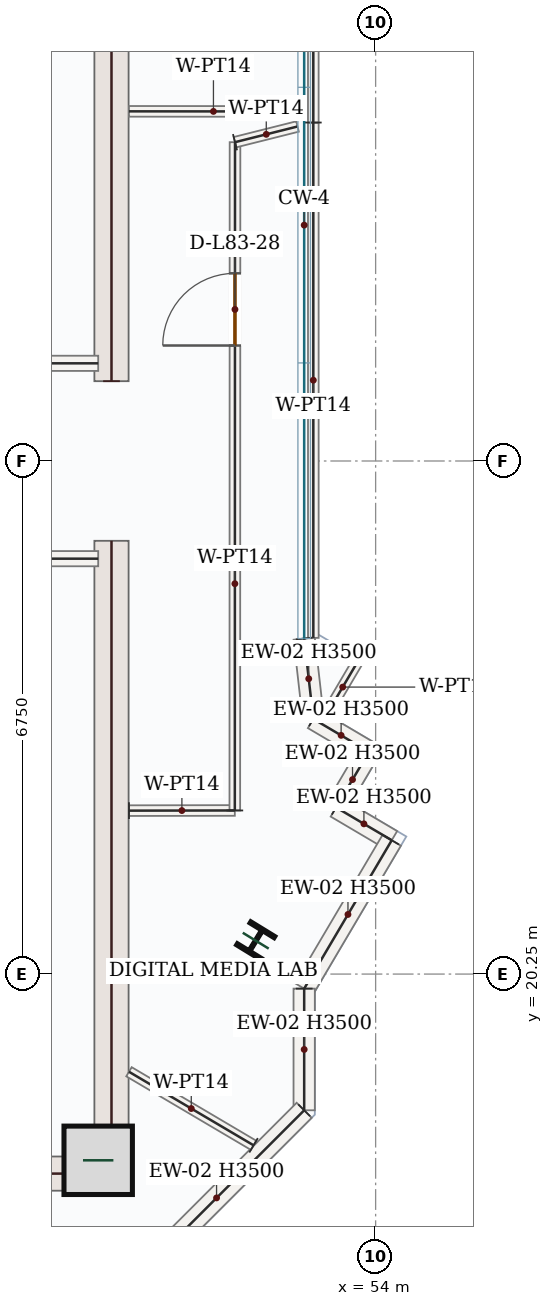
"""IFC4 building model, lengths in metres.
Left out: names, types, materials, properties, quantities, classifications, styles, units other than length and angle.
Written with IfcOpenShell. Run it as: python <this file> out.ifc"""

import sys

from ifc_helpers import new_model, si_unit, direction, frame, frame_2d, origin, origin_2d, place, context, subcontext, project, spatial, rectangle, i_section, extrude, source, transform, mapped, element, fill, save


model = new_model("IFC4")
c1 = context("Model", 3, precision=1e-05, world=origin(), true_north=direction((0.0, 1.0)))
c2 = subcontext(c1, "Body", "Model", "MODEL_VIEW")
j1 = project(units=[si_unit("LENGTHUNIT", "METRE"), si_unit("PLANEANGLEUNIT", "RADIAN")], contexts=[c1])
p1 = place(None, origin())
s1 = spatial("IfcSite", under=j1, at=p1, CompositionType="ELEMENT")
p2 = place(p1, origin())
s2 = spatial("IfcBuilding", under=s1, at=p2, CompositionType="ELEMENT")
p3 = place(p2, frame((0.0, 0.0, 342.3)))
s3 = spatial("IfcBuildingStorey", under=s2, at=p3, CompositionType="ELEMENT", Elevation=342.3)
m1 = source(origin(), c2, "Body", "SweptSolid", [
    extrude(rectangle(XDim=8.55, YDim=0.45, at=frame_2d((4.275, 0.0))), origin(), (0.0, 0.0, 1.0), 3.5),
])
for number, where, z_axis, x_axis in (
    (1, (50.525, 17.4, 0.0), (0.0, 0.0, 1.0), (0.0, 1.0, 0.0)),
    (2, (50.525, 28.05, 0.0), (0.0, 0.0, 1.0), (0.0, 1.0, 0.0)),
):
    element("IfcWall", number, at=place(p3, frame(where, z_axis=z_axis, x_axis=x_axis)), inside=s3, PredefinedType="SHEAR", context=c2, shape_type="MappedRepresentation", body=[
        mapped(m1, transform((0.0, 0.0, 0.0), x_axis=(1.0, 0.0, 0.0), y_axis=(0.0, 1.0, 0.0), z_axis=(0.0, 0.0, 1.0), scale=1.0)),
    ])
m2 = source(origin(), c2, "Body", "SweptSolid", [
    extrude(rectangle(XDim=7.1, YDim=0.45, at=frame_2d((3.55, 0.0))), origin(), (0.0, 0.0, 1.0), 3.5),
])
p4 = place(p3, frame((43.2, 17.625, 0.0), z_axis=(0.0, 0.0, 1.0), x_axis=(1.0, 0.0, 0.0)))
e3 = element("IfcWall", 3, at=p4, inside=s3, PredefinedType="SHEAR", context=c2, shape_type="MappedRepresentation", body=[
    mapped(m2, transform((0.0, 0.0, 0.0), x_axis=(1.0, 0.0, 0.0), y_axis=(0.0, 1.0, 0.0), z_axis=(0.0, 0.0, 1.0), scale=1.0)),
])
m3 = source(origin(), c2, "Body", "SweptSolid", [
    extrude(rectangle(XDim=0.9, YDim=0.9, at=origin_2d()), origin(), (0.0, 0.0, 1.0), 3.75),
])
p5 = place(p3, frame((50.35, 17.8, 0.0), z_axis=(0.0, 0.0, 1.0), x_axis=(1.0, 0.0, 0.0)))
e4 = element("IfcColumn", 4, at=p5, inside=s3, PredefinedType="COLUMN", context=c2, shape_type="MappedRepresentation", body=[
    mapped(m3, transform((0.0, 0.0, 0.0), x_axis=(1.0, 0.0, 0.0), y_axis=(0.0, 1.0, 0.0), z_axis=(0.0, 0.0, 1.0), scale=1.0)),
])
m4 = source(origin(), c2, "Body", "SweptSolid", [
    extrude(i_section(OverallWidth=0.369, OverallDepth=0.356, WebThickness=0.011, FlangeThickness=0.018, FilletRadius=0.018, at=origin_2d()), origin(), (0.0, 0.0, 1.0), 3.75),
])
p6 = place(p3, frame((52.423, 20.689, 0.0), z_axis=(0.0, 0.0, 1.0), x_axis=(-0.852640164354, 0.522498564716, 0.0)))
e5 = element("IfcColumn", 5, at=p6, inside=s3, PredefinedType="COLUMN", context=c2, shape_type="MappedRepresentation", body=[
    mapped(m4, transform((0.0, 0.0, 0.0), x_axis=(1.0, 0.0, 0.0), y_axis=(0.0, 1.0, 0.0), z_axis=(0.0, 0.0, 1.0), scale=1.0)),
])
m5 = source(origin(), c2, "Body", "SweptSolid", [
    extrude(rectangle(XDim=1.065, YDim=0.28, at=frame_2d((0.532, 0.0))), origin(), (0.0, 0.0, 1.0), 3.5),
])
p7 = place(p3, frame((53.06, 24.664, 0.0), z_axis=(0.0, 0.0, 1.0), x_axis=(0.112595815397, -0.993640871923, 0.0)))
e6 = element("IfcWall", 6, at=p7, inside=s3, PredefinedType="SOLIDWALL", context=c2, shape_type="MappedRepresentation", body=[
    mapped(m5, transform((0.0, 0.0, 0.0), x_axis=(1.0, 0.0, 0.0), y_axis=(0.0, 1.0, 0.0), z_axis=(0.0, 0.0, 1.0), scale=1.0)),
])
m6 = source(origin(), c2, "Body", "SweptSolid", [
    extrude(rectangle(XDim=0.85, YDim=0.28, at=frame_2d((0.425, 0.0))), origin(), (0.0, 0.0, 1.0), 3.5),
])
for number, where, z_axis, x_axis in (
    (7, (53.18, 23.606, 0.0), (0.0, 0.0, 1.0), (0.861, -0.508, 0.0)),
    (8, (53.912, 23.175, 0.0), (0.0, 0.0, 1.0), (-0.508, -0.861, 0.0)),
):
    element("IfcWall", number, at=place(p3, frame(where, z_axis=z_axis, x_axis=x_axis)), inside=s3, PredefinedType="SOLIDWALL", context=c2, shape_type="MappedRepresentation", body=[
        mapped(m6, transform((0.0, 0.0, 0.0), x_axis=(1.0, 0.0, 0.0), y_axis=(0.0, 1.0, 0.0), z_axis=(0.0, 0.0, 1.0), scale=1.0)),
    ])
m7 = source(origin(), c2, "Body", "SweptSolid", [
    extrude(rectangle(XDim=0.85, YDim=0.28, at=frame_2d((0.425, 0.0))), origin(), (0.0, 0.0, 1.0), 3.5),
])
p8 = place(p3, frame((53.48, 22.442, 0.0), z_axis=(0.0, 0.0, 1.0), x_axis=(0.861246626019, -0.508187218622, 0.0)))
e9 = element("IfcWall", 9, at=p8, inside=s3, PredefinedType="SOLIDWALL", context=c2, shape_type="MappedRepresentation", body=[
    mapped(m7, transform((0.0, 0.0, 0.0), x_axis=(1.0, 0.0, 0.0), y_axis=(0.0, 1.0, 0.0), z_axis=(0.0, 0.0, 1.0), scale=1.0)),
])
m8 = source(origin(), c2, "Body", "SweptSolid", [
    extrude(rectangle(XDim=2.266, YDim=0.28, at=frame_2d((1.133, 0.0))), origin(), (0.0, 0.0, 1.0), 3.5),
])
p9 = place(p3, frame((54.212, 22.01, 0.0), z_axis=(0.0, 0.0, 1.0), x_axis=(-0.508224770074, -0.861224467304, 0.0)))
e10 = element("IfcWall", 10, at=p9, inside=s3, PredefinedType="SOLIDWALL", context=c2, shape_type="MappedRepresentation", body=[
    mapped(m8, transform((0.0, 0.0, 0.0), x_axis=(1.0, 0.0, 0.0), y_axis=(0.0, 1.0, 0.0), z_axis=(0.0, 0.0, 1.0), scale=1.0)),
])
m9 = source(origin(), c2, "Body", "SweptSolid", [
    extrude(rectangle(XDim=1.601, YDim=0.28, at=frame_2d((0.8, 0.0))), origin(), (0.0, 0.0, 1.0), 3.5),
])
p10 = place(p3, frame((53.06, 20.059, 0.0), z_axis=(0.0, 0.0, 1.0), x_axis=(0.0, -1.0, 0.0)))
e11 = element("IfcWall", 11, at=p10, inside=s3, PredefinedType="SOLIDWALL", context=c2, shape_type="MappedRepresentation", body=[
    mapped(m9, transform((0.0, 0.0, 0.0), x_axis=(1.0, 0.0, 0.0), y_axis=(0.0, 1.0, 0.0), z_axis=(0.0, 0.0, 1.0), scale=1.0)),
])
m10 = source(origin(), c2, "Body", "SweptSolid", [
    extrude(rectangle(XDim=3.261, YDim=0.28, at=frame_2d((1.63, 0.0))), origin(), (0.0, 0.0, 1.0), 3.5),
])
p11 = place(p3, frame((53.06, 18.458, 0.0), z_axis=(0.0, 0.0, 1.0), x_axis=(-0.707106781187, -0.707106781187, 0.0)))
e12 = element("IfcWall", 12, at=p11, inside=s3, PredefinedType="SOLIDWALL", context=c2, shape_type="MappedRepresentation", body=[
    mapped(m10, transform((0.0, 0.0, 0.0), x_axis=(1.0, 0.0, 0.0), y_axis=(0.0, 1.0, 0.0), z_axis=(0.0, 0.0, 1.0), scale=1.0)),
])
m11 = source(origin(), c2, "Body", "SweptSolid", [
    extrude(rectangle(XDim=4.25, YDim=0.2, at=frame_2d((2.125, 0.0))), origin(), (0.0, 0.0, 1.0), 3.5),
])
for number, where, z_axis, x_axis in (
    (13, (46.1, 25.715, 0.0), (0.0, 0.0, 1.0), (1.0, 0.0, 0.0)),
    (14, (46.1, 28.285, 0.0), (0.0, 0.0, 1.0), (1.0, 0.0, 0.0)),
):
    element("IfcWall", number, at=place(p3, frame(where, z_axis=z_axis, x_axis=x_axis)), inside=s3, PredefinedType="SOLIDWALL", context=c2, shape_type="MappedRepresentation", body=[
        mapped(m11, transform((0.0, 0.0, 0.0), x_axis=(1.0, 0.0, 0.0), y_axis=(0.0, 1.0, 0.0), z_axis=(0.0, 0.0, 1.0), scale=1.0)),
    ])
m12 = source(origin(), c2, "Body", "SweptSolid", [
    extrude(rectangle(XDim=1.393, YDim=0.14, at=frame_2d((0.696, 0.0))), origin(), (0.0, 0.0, 1.0), 3.5),
])
p12 = place(p3, frame((50.755, 22.4, 0.0), z_axis=(0.0, 0.0, 1.0), x_axis=(0.999998755213, 0.001577838148, 0.0)))
e15 = element("IfcWall", 15, at=p12, inside=s3, PredefinedType="PARTITIONING", context=c2, shape_type="MappedRepresentation", body=[
    mapped(m12, transform((0.0, 0.0, 0.0), x_axis=(1.0, 0.0, 0.0), y_axis=(0.0, 1.0, 0.0), z_axis=(0.0, 0.0, 1.0), scale=1.0)),
])
p13 = place(p3, frame((52.147, 22.402, 0.0), z_axis=(0.0, 0.0, 1.0), x_axis=(0.000277685205, 0.999999961445, 0.0)))
e16 = element("IfcWall", 16, at=p13, inside=s3, PredefinedType="PARTITIONING", context=c2, shape_type="SweptSolid", body=[
    extrude(rectangle(XDim=8.792, YDim=0.14, at=frame_2d((4.396, 0.0))), origin(), (0.0, 0.0, 1.0), 3.5),
])
p14 = place(p13, frame((6.117, 0.0, 0.0)))
e17 = element("IfcOpeningElement", 17, at=p14, cuts=e16, PredefinedType="OPENING", context=c2, shape_type="SweptSolid", body=[
    extrude(rectangle(XDim=0.95, YDim=2.15, at=frame_2d((0.475, 1.075))), frame((0.0, 0.08, 0.0), z_axis=(0.0, -1.0, 0.0), x_axis=(1.0, 0.0, 0.0)), (0.0, 0.0, 1.0), 0.16),
])
m13 = source(origin(), c2, "Body", "SweptSolid", [
    extrude(rectangle(XDim=0.848, YDim=0.14, at=frame_2d((0.424, 0.0))), origin(), (0.0, 0.0, 1.0), 3.5),
])
p15 = place(p3, frame((52.15, 31.194, 0.0), z_axis=(0.0, 0.0, 1.0), x_axis=(0.969955921728, 0.243280722428, 0.0)))
e18 = element("IfcWall", 18, at=p15, inside=s3, PredefinedType="PARTITIONING", context=c2, shape_type="MappedRepresentation", body=[
    mapped(m13, transform((0.0, 0.0, 0.0), x_axis=(1.0, 0.0, 0.0), y_axis=(0.0, 1.0, 0.0), z_axis=(0.0, 0.0, 1.0), scale=1.0)),
])
m14 = source(origin(), c2, "Body", "SweptSolid", [
    extrude(rectangle(XDim=6.78, YDim=0.14, at=frame_2d((3.39, 0.0))), origin(), (0.0, 0.0, 1.0), 3.5),
])
p16 = place(p3, frame((53.18, 31.453, 0.0), z_axis=(0.0, 0.0, 1.0), x_axis=(7.2022759e-05, -0.999999997406, 0.0)))
e19 = element("IfcWall", 19, at=p16, inside=s3, PredefinedType="PARTITIONING", context=c2, shape_type="MappedRepresentation", body=[
    mapped(m14, transform((0.0, 0.0, 0.0), x_axis=(1.0, 0.0, 0.0), y_axis=(0.0, 1.0, 0.0), z_axis=(0.0, 0.0, 1.0), scale=1.0)),
])
m15 = source(origin(), c2, "Body", "SweptSolid", [
    extrude(rectangle(XDim=0.825, YDim=0.14, at=frame_2d((0.413, 0.0))), origin(), (0.0, 0.0, 1.0), 3.5),
])
p17 = place(p3, frame((53.776, 24.381, 0.0), z_axis=(0.0, 0.0, 1.0), x_axis=(-0.507472658058, -0.861667860213, 0.0)))
e20 = element("IfcWall", 20, at=p17, inside=s3, PredefinedType="PARTITIONING", context=c2, shape_type="MappedRepresentation", body=[
    mapped(m15, transform((0.0, 0.0, 0.0), x_axis=(1.0, 0.0, 0.0), y_axis=(0.0, 1.0, 0.0), z_axis=(0.0, 0.0, 1.0), scale=1.0)),
])
m16 = source(origin(), c2, "Body", "SweptSolid", [
    extrude(rectangle(XDim=1.904, YDim=0.14, at=frame_2d((0.952, 0.0))), origin(), (0.0, 0.0, 1.0), 3.5),
])
p18 = place(p3, frame((52.394, 17.997, 0.0), z_axis=(0.0, 0.0, 1.0), x_axis=(-0.86120470185, 0.508258262611, 0.0)))
e21 = element("IfcWall", 21, at=p18, inside=s3, PredefinedType="PARTITIONING", context=c2, shape_type="MappedRepresentation", body=[
    mapped(m16, transform((0.0, 0.0, 0.0), x_axis=(1.0, 0.0, 0.0), y_axis=(0.0, 1.0, 0.0), z_axis=(0.0, 0.0, 1.0), scale=1.0)),
])
m17 = source(origin(), c2, "Body", "SweptSolid", [
    extrude(rectangle(XDim=2.223, YDim=0.14, at=frame_2d((1.111, 0.0))), origin(), (0.0, 0.0, 1.0), 3.5),
])
p19 = place(p3, frame((52.978, 31.598, 0.0), z_axis=(0.0, 0.0, 1.0), x_axis=(-0.999999704402, 0.000768892567, 0.0)))
e22 = element("IfcWall", 22, at=p19, inside=s3, PredefinedType="PARTITIONING", context=c2, shape_type="MappedRepresentation", body=[
    mapped(m17, transform((0.0, 0.0, 0.0), x_axis=(1.0, 0.0, 0.0), y_axis=(0.0, 1.0, 0.0), z_axis=(0.0, 0.0, 1.0), scale=1.0)),
])
m18 = source(origin(), c2, "Body", "SweptSolid", [
    extrude(rectangle(XDim=4.139, YDim=0.14, at=frame_2d((2.07, 0.0))), origin(), (0.0, 0.0, 1.0), 3.5),
])
p20 = place(p3, frame((53.18, 35.592, 0.0), z_axis=(0.0, 0.0, 1.0), x_axis=(0.0, -1.0, 0.0)))
e23 = element("IfcWall", 23, at=p20, inside=s3, PredefinedType="PARTITIONING", context=c2, shape_type="MappedRepresentation", body=[
    mapped(m18, transform((0.0, 0.0, 0.0), x_axis=(1.0, 0.0, 0.0), y_axis=(0.0, 1.0, 0.0), z_axis=(0.0, 0.0, 1.0), scale=1.0)),
])
m19 = source(origin(), c2, "Body", "SweptSolid", [
    extrude(rectangle(XDim=0.95, YDim=2.15, at=frame_2d((0.475, 1.075))), frame((0.0, 0.025, 0.0), z_axis=(0.0, -1.0, 0.0), x_axis=(1.0, 0.0, 0.0)), (0.0, 0.0, 1.0), 0.05),
])
p21 = place(p14, origin())
e24 = element("IfcDoor", 24, at=p21, inside=s3, OperationType="SINGLE_SWING_LEFT", PredefinedType="DOOR", context=c2, shape_type="MappedRepresentation", body=[
    mapped(m19, transform((0.0, 0.0, 0.0), x_axis=(1.0, 0.0, 0.0), y_axis=(0.0, 1.0, 0.0), z_axis=(0.0, 0.0, 1.0), scale=1.0)),
])
fill(e17, e24)
save(model, sys.argv[1])
